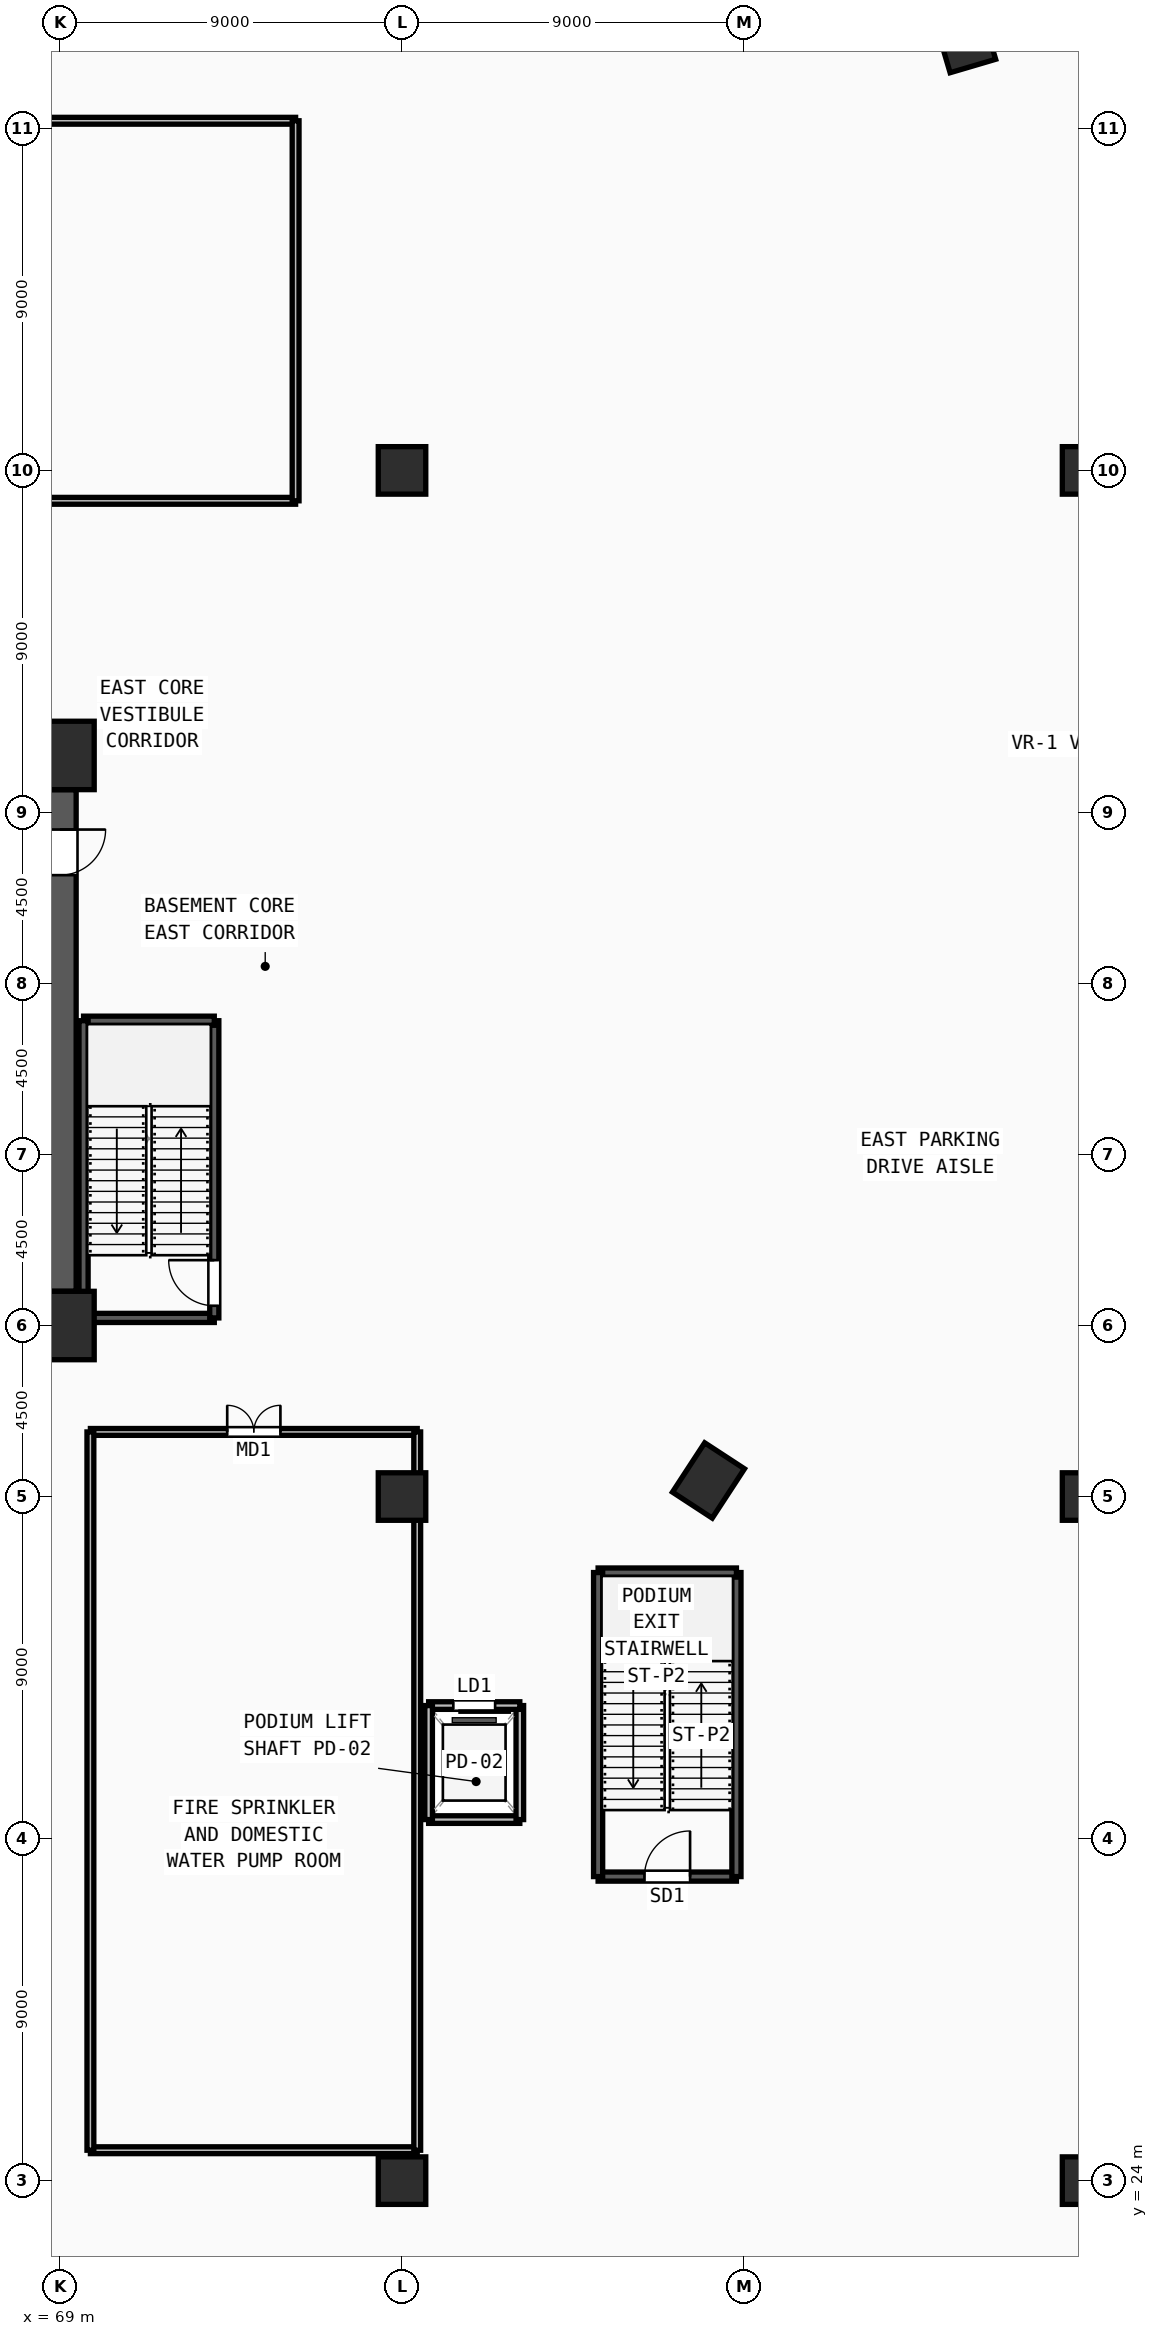
"""IFC4 building model, lengths in metres.
Left out: names, types, materials, properties, quantities, classifications, styles, units other than length and angle.
Written with IfcOpenShell. Run it as: python <this file> out.ifc"""

import sys

from ifc_helpers import new_model, si_unit, direction, frame, frame_2d, origin, origin_2d, place, context, subcontext, project, spatial, rectangle, extrude, source, transform, mapped, element, fill, save


model = new_model("IFC4")
c1 = context("Model", 3, precision=1e-05, world=origin(), true_north=direction((0.0, 1.0)))
c2 = subcontext(c1, "Body", "Model", "MODEL_VIEW")
j1 = project(units=[si_unit("LENGTHUNIT", "METRE"), si_unit("PLANEANGLEUNIT", "RADIAN")], contexts=[c1])
p1 = place(None, origin())
s1 = spatial("IfcSite", under=j1, at=p1, CompositionType="ELEMENT")
p2 = place(p1, origin())
s2 = spatial("IfcBuilding", under=s1, at=p2, CompositionType="ELEMENT")
p3 = place(p2, frame((0.0, 0.0, -4.8)))
s3 = spatial("IfcBuildingStorey", under=s2, at=p3, CompositionType="ELEMENT", Elevation=-4.8)
m1 = source(origin(), c2, "Body", "SweptSolid", [
    extrude(rectangle(XDim=1.8, YDim=1.8, at=origin_2d()), origin(), (0.0, 0.0, 1.0), 4.8),
])
for number, where, z_axis, x_axis in (
    (1, (69.0, 46.5, 0.0), (0.0, 0.0, 1.0), (1.0, 0.0, 0.0)),
    (2, (69.0, 61.5, 0.0), (0.0, 0.0, 1.0), (1.0, 0.0, 0.0)),
):
    element("IfcColumn", number, at=place(p3, frame(where, z_axis=z_axis, x_axis=x_axis)), inside=s3, PredefinedType="COLUMN", context=c2, shape_type="MappedRepresentation", body=[
        mapped(m1, transform((0.0, 0.0, 0.0), x_axis=(1.0, 0.0, 0.0), y_axis=(0.0, 1.0, 0.0), z_axis=(0.0, 0.0, 1.0), scale=1.0)),
    ])
m2 = source(origin(), c2, "Body", "SweptSolid", [
    extrude(rectangle(XDim=1.55, YDim=1.25, at=origin_2d()), origin(), (0.0, 0.0, 1.0), 4.8),
])
for number, where, z_axis, x_axis in (
    (3, (92.803, 80.384, 0.0), (0.0, 0.0, 1.0), (-0.283, 0.959, 0.0)),
    (4, (86.064, 42.423, 0.0), (0.0, 0.0, 1.0), (0.547, 0.837, 0.0)),
):
    element("IfcColumn", number, at=place(p3, frame(where, z_axis=z_axis, x_axis=x_axis)), inside=s3, PredefinedType="COLUMN", context=c2, shape_type="MappedRepresentation", body=[
        mapped(m2, transform((0.0, 0.0, 0.0), x_axis=(1.0, 0.0, 0.0), y_axis=(0.0, 1.0, 0.0), z_axis=(0.0, 0.0, 1.0), scale=1.0)),
    ])
m3 = source(origin(), c2, "Body", "SweptSolid", [
    extrude(rectangle(XDim=1.25, YDim=1.25, at=origin_2d()), origin(), (0.0, 0.0, 1.0), 4.8),
])
for number, where, z_axis, x_axis in (
    (5, (78.0, 24.0, 0.0), (0.0, 0.0, 1.0), (1.0, 0.0, 0.0)),
    (6, (96.0, 24.0, 0.0), (0.0, 0.0, 1.0), (1.0, 0.0, 0.0)),
    (7, (78.0, 42.0, 0.0), (0.0, 0.0, 1.0), (1.0, 0.0, 0.0)),
    (8, (96.0, 42.0, 0.0), (0.0, 0.0, 1.0), (1.0, 0.0, 0.0)),
    (9, (78.0, 69.0, 0.0), (0.0, 0.0, 1.0), (1.0, 0.0, 0.0)),
    (10, (96.0, 69.0, 0.0), (0.0, 0.0, 1.0), (1.0, 0.0, 0.0)),
):
    element("IfcColumn", number, at=place(p3, frame(where, z_axis=z_axis, x_axis=x_axis)), inside=s3, PredefinedType="COLUMN", context=c2, shape_type="MappedRepresentation", body=[
        mapped(m3, transform((0.0, 0.0, 0.0), x_axis=(1.0, 0.0, 0.0), y_axis=(0.0, 1.0, 0.0), z_axis=(0.0, 0.0, 1.0), scale=1.0)),
    ])
p4 = place(p3, frame((69.0, 60.6, 0.0), z_axis=(0.0, 0.0, 1.0), x_axis=(0.0, -1.0, 0.0)))
e11 = element("IfcWall", 11, at=p4, inside=s3, PredefinedType="SHEAR", context=c2, shape_type="SweptSolid", body=[
    extrude(rectangle(XDim=13.2, YDim=0.85, at=frame_2d((6.6, 0.0))), origin(), (0.0, 0.0, 1.0), 4.55),
])
m4 = source(origin(), c2, "Body", "SweptSolid", [
    extrude(rectangle(XDim=1.2, YDim=2.2, at=frame_2d((0.6, 1.1))), frame((0.0, 0.435, 0.0), z_axis=(0.0, -1.0, 0.0), x_axis=(1.0, 0.0, 0.0)), (0.0, 0.0, 1.0), 0.87),
])
p5 = place(p4, frame((1.05, 0.0, 0.0)))
e12 = element("IfcOpeningElement", 12, at=p5, cuts=e11, PredefinedType="OPENING", context=c2, shape_type="MappedRepresentation", body=[
    mapped(m4, transform((0.0, 0.0, 0.0), x_axis=(1.0, 0.0, 0.0), y_axis=(0.0, 1.0, 0.0), z_axis=(0.0, 0.0, 1.0), scale=1.0)),
])
p6 = place(p3, frame((69.62, 46.7, 0.0), z_axis=(0.0, 0.0, 1.0), x_axis=(1.0, 0.0, 0.0)))
e13 = element("IfcWall", 13, at=p6, inside=s3, PredefinedType="SOLIDWALL", context=c2, shape_type="SweptSolid", body=[
    extrude(rectangle(XDim=3.44, YDim=0.24, at=frame_2d((1.72, 0.0))), origin(), (0.0, 0.0, 1.0), 4.55),
])
p7 = place(p3, frame((73.06, 46.7, 0.0), z_axis=(0.0, 0.0, 1.0), x_axis=(0.0, 1.0, 0.0)))
e14 = element("IfcWall", 14, at=p7, inside=s3, PredefinedType="SOLIDWALL", context=c2, shape_type="SweptSolid", body=[
    extrude(rectangle(XDim=7.82, YDim=0.24, at=frame_2d((3.91, 0.0))), origin(), (0.0, 0.0, 1.0), 4.55),
])
m5 = source(origin(), c2, "Body", "SweptSolid", [
    extrude(rectangle(XDim=1.2, YDim=2.2, at=frame_2d((0.6, 1.1))), frame((0.0, 0.13, 0.0), z_axis=(0.0, -1.0, 0.0), x_axis=(1.0, 0.0, 0.0)), (0.0, 0.0, 1.0), 0.26),
])
p8 = place(p7, frame((0.32, 0.0, 0.0)))
e15 = element("IfcOpeningElement", 15, at=p8, cuts=e14, PredefinedType="OPENING", context=c2, shape_type="MappedRepresentation", body=[
    mapped(m5, transform((0.0, 0.0, 0.0), x_axis=(1.0, 0.0, 0.0), y_axis=(0.0, 1.0, 0.0), z_axis=(0.0, 0.0, 1.0), scale=1.0)),
])
p9 = place(p3, frame((73.06, 54.52, 0.0), z_axis=(0.0, 0.0, 1.0), x_axis=(-1.0, 0.0, 0.0)))
e16 = element("IfcWall", 16, at=p9, inside=s3, PredefinedType="SOLIDWALL", context=c2, shape_type="SweptSolid", body=[
    extrude(rectangle(XDim=3.44, YDim=0.24, at=frame_2d((1.72, 0.0))), origin(), (0.0, 0.0, 1.0), 4.55),
])
p10 = place(p3, frame((69.62, 54.52, 0.0), z_axis=(0.0, 0.0, 1.0), x_axis=(0.0, -1.0, 0.0)))
e17 = element("IfcWall", 17, at=p10, inside=s3, PredefinedType="SOLIDWALL", context=c2, shape_type="SweptSolid", body=[
    extrude(rectangle(XDim=7.82, YDim=0.24, at=frame_2d((3.91, 0.0))), origin(), (0.0, 0.0, 1.0), 4.55),
])
p11 = place(p3, frame((83.16, 32.0, 0.0), z_axis=(0.0, 0.0, 1.0), x_axis=(1.0, 0.0, 0.0)))
e18 = element("IfcWall", 18, at=p11, inside=s3, PredefinedType="SOLIDWALL", context=c2, shape_type="SweptSolid", body=[
    extrude(rectangle(XDim=3.64, YDim=0.24, at=frame_2d((1.82, 0.0))), origin(), (0.0, 0.0, 1.0), 4.55),
])
p12 = place(p11, frame((1.22, 0.0, 0.0)))
e19 = element("IfcOpeningElement", 19, at=p12, cuts=e18, PredefinedType="OPENING", context=c2, shape_type="MappedRepresentation", body=[
    mapped(m5, transform((0.0, 0.0, 0.0), x_axis=(1.0, 0.0, 0.0), y_axis=(0.0, 1.0, 0.0), z_axis=(0.0, 0.0, 1.0), scale=1.0)),
])
p13 = place(p3, frame((86.8, 32.0, 0.0), z_axis=(0.0, 0.0, 1.0), x_axis=(0.0, 1.0, 0.0)))
e20 = element("IfcWall", 20, at=p13, inside=s3, PredefinedType="SOLIDWALL", context=c2, shape_type="SweptSolid", body=[
    extrude(rectangle(XDim=8.0, YDim=0.24, at=frame_2d((4.0, 0.0))), origin(), (0.0, 0.0, 1.0), 4.55),
])
p14 = place(p3, frame((86.8, 40.0, 0.0), z_axis=(0.0, 0.0, 1.0), x_axis=(-1.0, 0.0, 0.0)))
e21 = element("IfcWall", 21, at=p14, inside=s3, PredefinedType="SOLIDWALL", context=c2, shape_type="SweptSolid", body=[
    extrude(rectangle(XDim=3.64, YDim=0.24, at=frame_2d((1.82, 0.0))), origin(), (0.0, 0.0, 1.0), 4.55),
])
p15 = place(p3, frame((83.16, 40.0, 0.0), z_axis=(0.0, 0.0, 1.0), x_axis=(0.0, -1.0, 0.0)))
e22 = element("IfcWall", 22, at=p15, inside=s3, PredefinedType="SOLIDWALL", context=c2, shape_type="SweptSolid", body=[
    extrude(rectangle(XDim=8.0, YDim=0.24, at=frame_2d((4.0, 0.0))), origin(), (0.0, 0.0, 1.0), 4.55),
])
p16 = place(p3, frame((78.7, 33.5, 0.0), z_axis=(0.0, 0.0, 1.0), x_axis=(1.0, 0.0, 0.0)))
e23 = element("IfcWall", 23, at=p16, inside=s3, PredefinedType="SOLIDWALL", context=c2, shape_type="SweptSolid", body=[
    extrude(rectangle(XDim=2.4, YDim=0.2, at=frame_2d((1.2, 0.0))), origin(), (0.0, 0.0, 1.0), 4.55),
])
p17 = place(p3, frame((81.1, 33.5, 0.0), z_axis=(0.0, 0.0, 1.0), x_axis=(0.0, 1.0, 0.0)))
e24 = element("IfcWall", 24, at=p17, inside=s3, PredefinedType="SOLIDWALL", context=c2, shape_type="SweptSolid", body=[
    extrude(rectangle(XDim=3.0, YDim=0.2, at=frame_2d((1.5, 0.0))), origin(), (0.0, 0.0, 1.0), 4.55),
])
p18 = place(p3, frame((81.1, 36.5, 0.0), z_axis=(0.0, 0.0, 1.0), x_axis=(-1.0, 0.0, 0.0)))
e25 = element("IfcWall", 25, at=p18, inside=s3, PredefinedType="SOLIDWALL", context=c2, shape_type="SweptSolid", body=[
    extrude(rectangle(XDim=2.4, YDim=0.2, at=frame_2d((1.2, 0.0))), origin(), (0.0, 0.0, 1.0), 4.55),
])
m6 = source(origin(), c2, "Body", "SweptSolid", [
    extrude(rectangle(XDim=1.1, YDim=2.2, at=frame_2d((0.55, 1.1))), frame((0.0, 0.11, 0.0), z_axis=(0.0, -1.0, 0.0), x_axis=(1.0, 0.0, 0.0)), (0.0, 0.0, 1.0), 0.22),
])
p19 = place(p18, frame((0.65, 0.0, 0.0)))
e26 = element("IfcOpeningElement", 26, at=p19, cuts=e25, PredefinedType="OPENING", context=c2, shape_type="MappedRepresentation", body=[
    mapped(m6, transform((0.0, 0.0, 0.0), x_axis=(1.0, 0.0, 0.0), y_axis=(0.0, 1.0, 0.0), z_axis=(0.0, 0.0, 1.0), scale=1.0)),
])
p20 = place(p3, frame((78.7, 36.5, 0.0), z_axis=(0.0, 0.0, 1.0), x_axis=(0.0, -1.0, 0.0)))
e27 = element("IfcWall", 27, at=p20, inside=s3, PredefinedType="SOLIDWALL", context=c2, shape_type="SweptSolid", body=[
    extrude(rectangle(XDim=3.0, YDim=0.2, at=frame_2d((1.5, 0.0))), origin(), (0.0, 0.0, 1.0), 4.55),
])
p21 = place(p3, frame((69.8, 43.7, 0.0), z_axis=(0.0, 0.0, 1.0), x_axis=(1.0, 0.0, 0.0)))
e28 = element("IfcWall", 28, at=p21, inside=s3, PredefinedType="PARTITIONING", context=c2, shape_type="SweptSolid", body=[
    extrude(rectangle(XDim=8.6, YDim=0.18, at=frame_2d((4.3, 0.0))), origin(), (0.0, 0.0, 1.0), 4.55),
])
m7 = source(origin(), c2, "Body", "SweptSolid", [
    extrude(rectangle(XDim=1.4, YDim=2.25, at=frame_2d((0.7, 1.125))), frame((0.0, 0.1, 0.0), z_axis=(0.0, -1.0, 0.0), x_axis=(1.0, 0.0, 0.0)), (0.0, 0.0, 1.0), 0.2),
])
p22 = place(p21, frame((3.6, 0.0, 0.0)))
e29 = element("IfcOpeningElement", 29, at=p22, cuts=e28, PredefinedType="OPENING", context=c2, shape_type="MappedRepresentation", body=[
    mapped(m7, transform((0.0, 0.0, 0.0), x_axis=(1.0, 0.0, 0.0), y_axis=(0.0, 1.0, 0.0), z_axis=(0.0, 0.0, 1.0), scale=1.0)),
])
p23 = place(p3, frame((60.2, 68.2, 0.0), z_axis=(0.0, 0.0, 1.0), x_axis=(1.0, 0.0, 0.0)))
e30 = element("IfcWall", 30, at=p23, inside=s3, PredefinedType="PARTITIONING", context=c2, shape_type="SweptSolid", body=[
    extrude(rectangle(XDim=15.0, YDim=0.18, at=frame_2d((7.5, 0.0))), origin(), (0.0, 0.0, 1.0), 4.55),
])
p24 = place(p23, frame((6.8, 0.0, 0.0)))
e31 = element("IfcOpeningElement", 31, at=p24, cuts=e30, PredefinedType="OPENING", context=c2, shape_type="MappedRepresentation", body=[
    mapped(m7, transform((0.0, 0.0, 0.0), x_axis=(1.0, 0.0, 0.0), y_axis=(0.0, 1.0, 0.0), z_axis=(0.0, 0.0, 1.0), scale=1.0)),
])
p25 = place(p3, frame((69.8, 24.8, 0.0), z_axis=(0.0, 0.0, 1.0), x_axis=(1.0, 0.0, 0.0)))
e32 = element("IfcWall", 32, at=p25, inside=s3, PredefinedType="PARTITIONING", context=c2, shape_type="SweptSolid", body=[
    extrude(rectangle(XDim=8.6, YDim=0.18, at=frame_2d((4.3, 0.0))), origin(), (0.0, 0.0, 1.0), 4.55),
])
for number, where, z_axis, x_axis in (
    (33, (69.8, 24.8, 0.0), (0.0, 0.0, 1.0), (0.0, 1.0, 0.0)),
    (34, (78.4, 24.8, 0.0), (0.0, 0.0, 1.0), (0.0, 1.0, 0.0)),
):
    element("IfcWall", number, at=place(p3, frame(where, z_axis=z_axis, x_axis=x_axis)), inside=s3, PredefinedType="PARTITIONING", context=c2, shape_type="SweptSolid", body=[
        extrude(rectangle(XDim=18.9, YDim=0.18, at=frame_2d((9.45, 0.0))), origin(), (0.0, 0.0, 1.0), 4.55),
    ])
p26 = place(p3, frame((60.2, 78.2, 0.0), z_axis=(0.0, 0.0, 1.0), x_axis=(1.0, 0.0, 0.0)))
e35 = element("IfcWall", 35, at=p26, inside=s3, PredefinedType="PARTITIONING", context=c2, shape_type="SweptSolid", body=[
    extrude(rectangle(XDim=15.0, YDim=0.18, at=frame_2d((7.5, 0.0))), origin(), (0.0, 0.0, 1.0), 4.55),
])
p27 = place(p3, frame((75.2, 68.2, 0.0), z_axis=(0.0, 0.0, 1.0), x_axis=(0.0, 1.0, 0.0)))
e36 = element("IfcWall", 36, at=p27, inside=s3, PredefinedType="PARTITIONING", context=c2, shape_type="SweptSolid", body=[
    extrude(rectangle(XDim=10.0, YDim=0.18, at=frame_2d((5.0, 0.0))), origin(), (0.0, 0.0, 1.0), 4.55),
])
m8 = source(origin(), c2, "Body", "SweptSolid", [
    extrude(rectangle(XDim=1.2, YDim=2.2, at=frame_2d((0.6, 1.1))), frame((0.0, 0.025, 0.0), z_axis=(0.0, -1.0, 0.0), x_axis=(1.0, 0.0, 0.0)), (0.0, 0.0, 1.0), 0.05),
])
p28 = place(p5, origin())
e37 = element("IfcDoor", 37, at=p28, inside=s3, OperationType="SINGLE_SWING_LEFT", PredefinedType="DOOR", context=c2, shape_type="MappedRepresentation", body=[
    mapped(m8, transform((0.0, 0.0, 0.0), x_axis=(1.0, 0.0, 0.0), y_axis=(0.0, 1.0, 0.0), z_axis=(0.0, 0.0, 1.0), scale=1.0)),
])
fill(e12, e37)
p29 = place(p8, origin())
e38 = element("IfcDoor", 38, at=p29, inside=s3, OperationType="SINGLE_SWING_RIGHT", PredefinedType="DOOR", context=c2, shape_type="MappedRepresentation", body=[
    mapped(m8, transform((0.0, 0.0, 0.0), x_axis=(1.0, 0.0, 0.0), y_axis=(0.0, 1.0, 0.0), z_axis=(0.0, 0.0, 1.0), scale=1.0)),
])
fill(e15, e38)
p30 = place(p12, origin())
e39 = element("IfcDoor", 39, at=p30, inside=s3, OperationType="SINGLE_SWING_RIGHT", PredefinedType="DOOR", context=c2, shape_type="MappedRepresentation", body=[
    mapped(m8, transform((0.0, 0.0, 0.0), x_axis=(1.0, 0.0, 0.0), y_axis=(0.0, 1.0, 0.0), z_axis=(0.0, 0.0, 1.0), scale=1.0)),
])
fill(e19, e39)
m9 = source(origin(), c2, "Body", "SweptSolid", [
    extrude(rectangle(XDim=1.1, YDim=2.2, at=frame_2d((0.55, 1.1))), frame((0.0, 0.025, 0.0), z_axis=(0.0, -1.0, 0.0), x_axis=(1.0, 0.0, 0.0)), (0.0, 0.0, 1.0), 0.05),
])
p31 = place(p19, origin())
e40 = element("IfcDoor", 40, at=p31, inside=s3, OperationType="SLIDING_TO_LEFT", PredefinedType="DOOR", context=c2, shape_type="MappedRepresentation", body=[
    mapped(m9, transform((0.0, 0.0, 0.0), x_axis=(1.0, 0.0, 0.0), y_axis=(0.0, 1.0, 0.0), z_axis=(0.0, 0.0, 1.0), scale=1.0)),
])
fill(e26, e40)
m10 = source(origin(), c2, "Body", "SweptSolid", [
    extrude(rectangle(XDim=1.4, YDim=2.25, at=frame_2d((0.7, 1.125))), frame((0.0, 0.025, 0.0), z_axis=(0.0, -1.0, 0.0), x_axis=(1.0, 0.0, 0.0)), (0.0, 0.0, 1.0), 0.05),
])
p32 = place(p22, origin())
e41 = element("IfcDoor", 41, at=p32, inside=s3, OperationType="DOUBLE_DOOR_SINGLE_SWING", PredefinedType="DOOR", context=c2, shape_type="MappedRepresentation", body=[
    mapped(m10, transform((0.0, 0.0, 0.0), x_axis=(1.0, 0.0, 0.0), y_axis=(0.0, 1.0, 0.0), z_axis=(0.0, 0.0, 1.0), scale=1.0)),
])
fill(e29, e41)
save(model, sys.argv[1])
